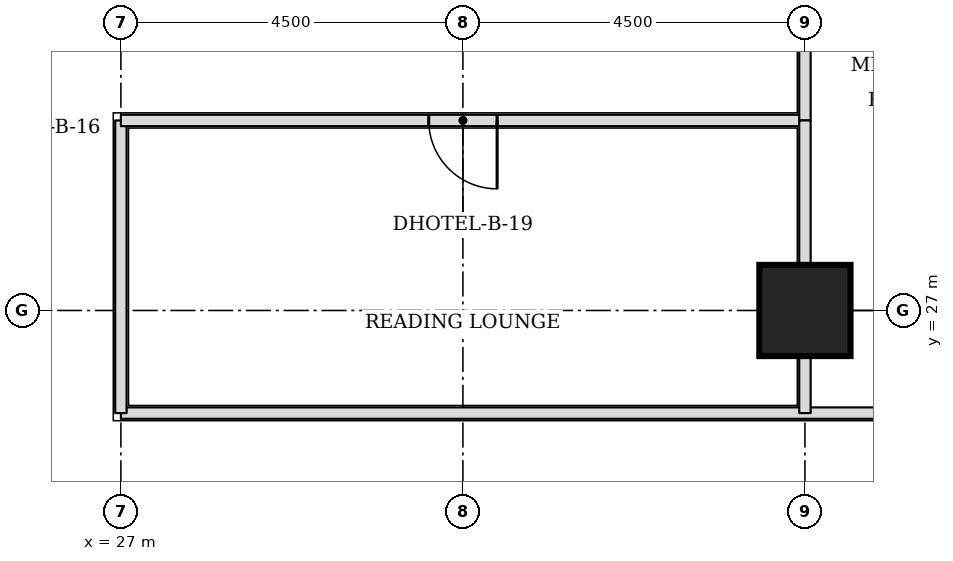
"""IFC4 building model, lengths in metres.
Left out: names, types, materials, properties, quantities, classifications, styles, units other than length and angle.
Written with IfcOpenShell. Run it as: python <this file> out.ifc"""

import sys

from ifc_helpers import new_model, si_unit, direction, frame, frame_2d, origin, origin_2d, place, context, subcontext, project, spatial, rectangle, extrude, element, fill, save


model = new_model("IFC4")
c1 = context("Model", 3, precision=1e-05, world=origin(), true_north=direction((0.0, 1.0)))
c2 = subcontext(c1, "Body", "Model", "MODEL_VIEW")
j1 = project(units=[si_unit("LENGTHUNIT", "METRE"), si_unit("PLANEANGLEUNIT", "RADIAN")], contexts=[c1])
p1 = place(None, origin())
s1 = spatial("IfcSite", under=j1, at=p1, CompositionType="ELEMENT")
p2 = place(p1, origin())
s2 = spatial("IfcBuilding", under=s1, at=p2, CompositionType="ELEMENT")
p3 = place(p2, frame((0.0, 0.0, 52.8)))
s3 = spatial("IfcBuildingStorey", under=s2, at=p3, CompositionType="ELEMENT", Elevation=52.8)
p4 = place(p3, frame((36.0, 27.0, 0.0), z_axis=(0.0, 0.0, 1.0), x_axis=(1.0, 0.0, 0.0)))
e1 = element("IfcColumn", 1, at=p4, inside=s3, PredefinedType="COLUMN", context=c2, shape_type="SweptSolid", body=[
    extrude(rectangle(XDim=1.2, YDim=1.2, at=origin_2d()), origin(), (0.0, 0.0, 1.0), 3.3),
])
p5 = place(p3, frame((27.0, 25.65, 0.0), z_axis=(0.0, 0.0, 1.0), x_axis=(1.0, 0.0, 0.0)))
e2 = element("IfcWall", 2, at=p5, inside=s3, PredefinedType="PARTITIONING", context=c2, shape_type="SweptSolid", body=[
    extrude(rectangle(XDim=11.5, YDim=0.15, at=frame_2d((5.75, 0.0))), origin(), (0.0, 0.0, 1.0), 3.08),
])
p6 = place(p3, frame((27.0, 25.65, 0.0), z_axis=(0.0, 0.0, 1.0), x_axis=(0.0, 1.0, 0.0)))
e3 = element("IfcWall", 3, at=p6, inside=s3, PredefinedType="PARTITIONING", context=c2, shape_type="SweptSolid", body=[
    extrude(rectangle(XDim=3.85, YDim=0.15, at=frame_2d((1.925, 0.0))), origin(), (0.0, 0.0, 1.0), 3.08),
])
p7 = place(p3, frame((27.0, 29.5, 0.0), z_axis=(0.0, 0.0, 1.0), x_axis=(1.0, 0.0, 0.0)))
e4 = element("IfcWall", 4, at=p7, inside=s3, PredefinedType="PARTITIONING", context=c2, shape_type="SweptSolid", body=[
    extrude(rectangle(XDim=9.0, YDim=0.15, at=frame_2d((4.5, 0.0))), origin(), (0.0, 0.0, 1.0), 3.08),
])
p8 = place(p7, frame((4.05, 0.0, 0.0)))
e5 = element("IfcOpeningElement", 5, at=p8, cuts=e4, PredefinedType="OPENING", context=c2, shape_type="SweptSolid", body=[
    extrude(rectangle(XDim=0.9, YDim=2.1, at=frame_2d((0.45, 1.05))), frame((0.0, 0.085, 0.0), z_axis=(0.0, -1.0, 0.0), x_axis=(1.0, 0.0, 0.0)), (0.0, 0.0, 1.0), 0.17),
])
p9 = place(p3, frame((36.0, 29.5, 0.0), z_axis=(0.0, 0.0, 1.0), x_axis=(0.0, 1.0, 0.0)))
e6 = element("IfcWall", 6, at=p9, inside=s3, PredefinedType="PARTITIONING", context=c2, shape_type="SweptSolid", body=[
    extrude(rectangle(XDim=1.95, YDim=0.15, at=frame_2d((0.975, 0.0))), origin(), (0.0, 0.0, 1.0), 2.33),
])
p10 = place(p3, frame((36.0, 25.65, 0.0), z_axis=(0.0, 0.0, 1.0), x_axis=(0.0, 1.0, 0.0)))
e7 = element("IfcWall", 7, at=p10, inside=s3, PredefinedType="PARTITIONING", context=c2, shape_type="SweptSolid", body=[
    extrude(rectangle(XDim=3.85, YDim=0.15, at=frame_2d((1.925, 0.0))), origin(), (0.0, 0.0, 1.0), 2.33),
])
p11 = place(p8, frame((0.9, 0.0, 0.0), z_axis=(0.0, 0.0, 1.0), x_axis=(-1.0, 0.0, 0.0)))
e8 = element("IfcDoor", 8, at=p11, inside=s3, OperationType="SINGLE_SWING_LEFT", PredefinedType="DOOR", context=c2, shape_type="SweptSolid", body=[
    extrude(rectangle(XDim=0.9, YDim=2.1, at=frame_2d((0.45, 1.05))), frame((0.0, 0.025, 0.0), z_axis=(0.0, -1.0, 0.0), x_axis=(1.0, 0.0, 0.0)), (0.0, 0.0, 1.0), 0.05),
])
fill(e5, e8)
save(model, sys.argv[1])
